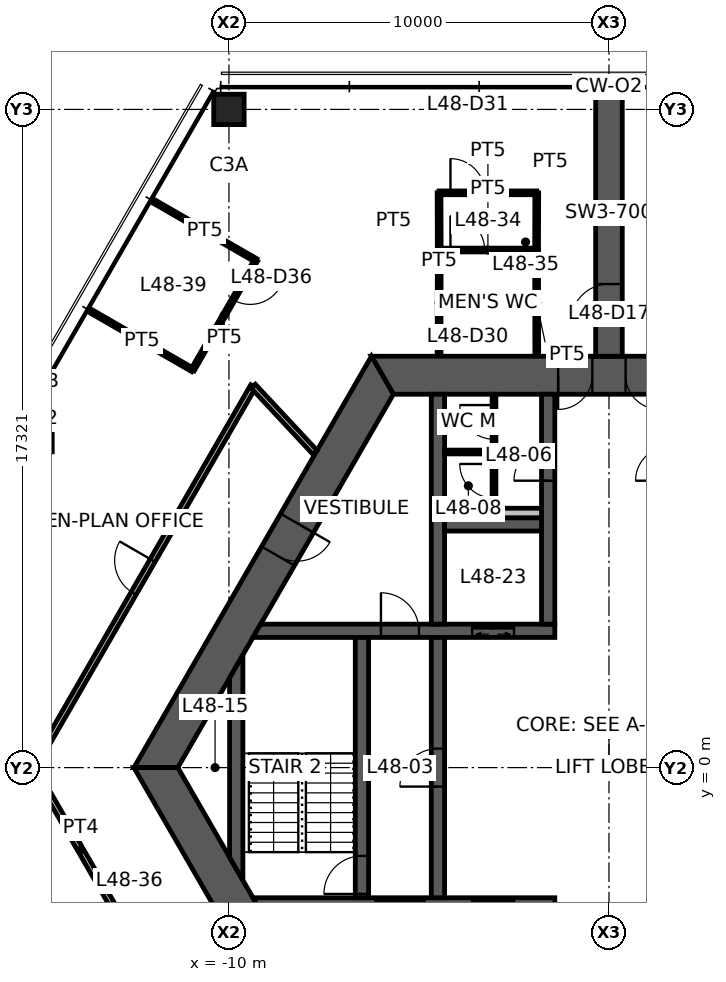
"""IFC4 building model, lengths in metres.
Left out: names, types, materials, properties, quantities, classifications, styles, units other than length and angle.
Written with IfcOpenShell. Run it as: python <this file> out.ifc"""

import sys

from ifc_helpers import new_model, si_unit, direction, frame, frame_2d, origin, origin_2d, place, context, subcontext, project, spatial, polyline, rectangle, hollow_rectangle, outline, extrude, element, fill, save


model = new_model("IFC4")
c1 = context("Model", 3, precision=1e-05, world=origin(), true_north=direction((0.0, 1.0)))
c2 = subcontext(c1, "Body", "Model", "MODEL_VIEW")
j1 = project(units=[si_unit("LENGTHUNIT", "METRE"), si_unit("PLANEANGLEUNIT", "RADIAN")], contexts=[c1])
p1 = place(None, origin())
s1 = spatial("IfcSite", under=j1, at=p1, CompositionType="ELEMENT")
p2 = place(p1, origin())
s2 = spatial("IfcBuilding", under=s1, at=p2, CompositionType="ELEMENT")
p3 = place(p2, frame((0.0, 0.0, 191.6)))
s3 = spatial("IfcBuildingStorey", under=s2, at=p3, CompositionType="ELEMENT", Elevation=191.6)
p4 = place(p3, frame((-10.0, 17.321, 0.0), z_axis=(0.0, 0.0, 1.0), x_axis=(1.0, 0.0, 0.0)))
e1 = element("IfcColumn", 1, at=p4, inside=s3, PredefinedType="COLUMN", context=c2, shape_type="SweptSolid", body=[
    extrude(hollow_rectangle(XDim=0.8, YDim=0.8, WallThickness=0.045, at=origin_2d()), origin(), (0.0, 0.0, 1.0), 3.9),
])
p5 = place(p3, frame((5.961, 10.325, 0.0), z_axis=(0.0, 0.0, 1.0), x_axis=(-1.0, 0.0, 0.0)))
e2 = element("IfcWall", 2, at=p5, inside=s3, PredefinedType="SHEAR", context=c2, shape_type="SweptSolid", body=[
    extrude(outline(polyline([(-0.289, -0.5), (4.624, -0.5), (5.523, -0.5), (6.399, -0.5), (7.299, -0.5), (12.211, -0.5), (11.634, 0.5), (7.299, 0.5), (6.399, 0.5), (5.523, 0.5), (4.624, 0.5), (0.289, 0.5), (-0.289, -0.5)])), origin(), (0.0, 0.0, 1.0), 3.9),
])
p6 = place(p5, frame((6.399, 0.0, 0.0)))
e3 = element("IfcOpeningElement", 3, at=p6, cuts=e2, PredefinedType="OPENING", context=c2, shape_type="SweptSolid", body=[
    extrude(rectangle(XDim=0.9, YDim=2.1, at=frame_2d((0.45, 1.05))), frame((0.0, 0.51, 0.0), z_axis=(0.0, -1.0, 0.0), x_axis=(1.0, 0.0, 0.0)), (0.0, 0.0, 1.0), 1.02),
])
p7 = place(p5, frame((4.624, 0.0, 0.0)))
e4 = element("IfcOpeningElement", 4, at=p7, cuts=e2, PredefinedType="OPENING", context=c2, shape_type="SweptSolid", body=[
    extrude(rectangle(XDim=0.9, YDim=2.1, at=frame_2d((0.45, 1.05))), frame((0.0, 0.51, 0.0), z_axis=(0.0, -1.0, 0.0), x_axis=(1.0, 0.0, 0.0)), (0.0, 0.0, 1.0), 1.02),
])
p8 = place(p3, frame((-5.961, 10.325, 0.0), z_axis=(0.0, 0.0, 1.0), x_axis=(-0.500004296715, -0.866022923061, 0.0)))
e5 = element("IfcWall", 5, at=p8, inside=s3, PredefinedType="SHEAR", context=c2, shape_type="SweptSolid", body=[
    extrude(outline(polyline([(-0.289, -0.5), (4.494, -0.5), (5.494, -0.5), (12.211, -0.5), (11.634, 0.5), (5.494, 0.5), (4.494, 0.5), (0.289, 0.5), (-0.289, -0.5)])), origin(), (0.0, 0.0, 1.0), 3.9),
])
p9 = place(p8, frame((4.494, 0.0, 0.0)))
e6 = element("IfcOpeningElement", 6, at=p9, cuts=e5, PredefinedType="OPENING", context=c2, shape_type="SweptSolid", body=[
    extrude(rectangle(XDim=1.0, YDim=2.1, at=frame_2d((0.5, 1.05))), frame((0.0, 0.51, 0.0), z_axis=(0.0, -1.0, 0.0), x_axis=(1.0, 0.0, 0.0)), (0.0, 0.0, 1.0), 1.02),
])
p10 = place(p3, frame((-11.922, 0.0, 0.0), z_axis=(0.0, 0.0, 1.0), x_axis=(0.500004296715, -0.866022923061, 0.0)))
e7 = element("IfcWall", 7, at=p10, inside=s3, PredefinedType="SHEAR", context=c2, shape_type="SweptSolid", body=[
    extrude(outline(polyline([(-0.289, -0.5), (6.331, -0.5), (7.131, -0.5), (12.211, -0.5), (11.634, 0.5), (7.131, 0.5), (6.331, 0.5), (0.289, 0.5), (-0.289, -0.5)])), origin(), (0.0, 0.0, 1.0), 3.9),
])
p11 = place(p10, frame((6.331, 0.0, 0.0)))
e8 = element("IfcOpeningElement", 8, at=p11, cuts=e7, PredefinedType="OPENING", context=c2, shape_type="SweptSolid", body=[
    extrude(rectangle(XDim=0.8, YDim=2.1, at=frame_2d((0.4, 1.05))), frame((0.0, 0.51, 0.0), z_axis=(0.0, -1.0, 0.0), x_axis=(1.0, 0.0, 0.0)), (0.0, 0.0, 1.0), 1.02),
])
p12 = place(p3, frame((0.0, 10.825, 0.0), z_axis=(0.0, 0.0, 1.0), x_axis=(0.0, 1.0, 0.0)))
e9 = element("IfcWall", 9, at=p12, inside=s3, PredefinedType="SHEAR", context=c2, shape_type="SweptSolid", body=[
    extrude(rectangle(XDim=6.946, YDim=0.7, at=frame_2d((3.473, 0.0))), origin(), (0.0, 0.0, 1.0), 3.9),
])
p13 = place(p12, frame((0.9, 0.0, 0.0)))
e10 = element("IfcOpeningElement", 10, at=p13, cuts=e9, PredefinedType="OPENING", context=c2, shape_type="SweptSolid", body=[
    extrude(rectangle(XDim=1.0, YDim=2.1, at=frame_2d((0.5, 1.05))), frame((0.0, 0.36, 0.0), z_axis=(0.0, -1.0, 0.0), x_axis=(1.0, 0.0, 0.0)), (0.0, 0.0, 1.0), 0.72),
])
p14 = place(p3, frame((-9.266, 3.6, 0.0), z_axis=(0.0, 0.0, 1.0), x_axis=(1.0, 0.0, 0.0)))
e11 = element("IfcWall", 11, at=p14, inside=s3, PredefinedType="SHEAR", context=c2, shape_type="SweptSolid", body=[
    extrude(outline(polyline([(-0.101, -0.175), (3.266, -0.175), (4.266, -0.175), (5.667, -0.175), (6.767, -0.175), (7.841, -0.175), (7.841, 0.175), (6.767, 0.175), (5.667, 0.175), (4.266, 0.175), (3.266, 0.175), (0.101, 0.175), (-0.101, -0.175)])), origin(), (0.0, 0.0, 1.0), 3.9),
])
p15 = place(p14, frame((3.266, 0.0, 0.0)))
e12 = element("IfcOpeningElement", 12, at=p15, cuts=e11, PredefinedType="OPENING", context=c2, shape_type="SweptSolid", body=[
    extrude(rectangle(XDim=1.0, YDim=2.1, at=frame_2d((0.5, 1.05))), frame((0.0, 0.185, 0.0), z_axis=(0.0, -1.0, 0.0), x_axis=(1.0, 0.0, 0.0)), (0.0, 0.0, 1.0), 0.37),
])
p16 = place(p14, frame((5.667, 0.0, 0.0)))
e13 = element("IfcOpeningElement", 13, at=p16, cuts=e11, PredefinedType="OPENING", context=c2, shape_type="SweptSolid", body=[
    extrude(rectangle(XDim=1.1, YDim=2.1, at=frame_2d((0.55, 1.05))), frame((0.0, 0.185, 0.0), z_axis=(0.0, -1.0, 0.0), x_axis=(1.0, 0.0, 0.0)), (0.0, 0.0, 1.0), 0.37),
])
p17 = place(p3, frame((-9.266, -3.6, 0.0), z_axis=(0.0, 0.0, 1.0), x_axis=(1.0, 0.0, 0.0)))
e14 = element("IfcWall", 14, at=p17, inside=s3, PredefinedType="SHEAR", context=c2, shape_type="SweptSolid", body=[
    extrude(outline(polyline([(0.101, -0.175), (3.116, -0.175), (4.417, -0.175), (5.667, -0.175), (6.767, -0.175), (7.841, -0.175), (7.841, 0.175), (6.767, 0.175), (5.667, 0.175), (4.417, 0.175), (3.116, 0.175), (-0.101, 0.175), (0.101, -0.175)])), origin(), (0.0, 0.0, 1.0), 3.9),
])
p18 = place(p17, frame((5.667, 0.0, 0.0)))
e15 = element("IfcOpeningElement", 15, at=p18, cuts=e14, PredefinedType="OPENING", context=c2, shape_type="SweptSolid", body=[
    extrude(rectangle(XDim=1.1, YDim=2.1, at=frame_2d((0.55, 1.05))), frame((0.0, 0.185, 0.0), z_axis=(0.0, -1.0, 0.0), x_axis=(1.0, 0.0, 0.0)), (0.0, 0.0, 1.0), 0.37),
])
p19 = place(p17, frame((3.116, 0.0, 0.0)))
e16 = element("IfcOpeningElement", 16, at=p19, cuts=e14, PredefinedType="OPENING", context=c2, shape_type="SweptSolid", body=[
    extrude(rectangle(XDim=1.3, YDim=2.1, at=frame_2d((0.65, 1.05))), frame((0.0, 0.185, 0.0), z_axis=(0.0, -1.0, 0.0), x_axis=(1.0, 0.0, 0.0)), (0.0, 0.0, 1.0), 0.37),
])
p20 = place(p3, frame((-1.6, 3.775, 0.0), z_axis=(0.0, 0.0, 1.0), x_axis=(0.0, 1.0, 0.0)))
e17 = element("IfcWall", 17, at=p20, inside=s3, PredefinedType="SHEAR", context=c2, shape_type="SweptSolid", body=[
    extrude(rectangle(XDim=6.05, YDim=0.35, at=frame_2d((3.025, 0.0))), origin(), (0.0, 0.0, 1.0), 3.9),
])
p21 = place(p20, frame((3.775, 0.0, 0.0)))
e18 = element("IfcOpeningElement", 18, at=p21, cuts=e17, PredefinedType="OPENING", context=c2, shape_type="SweptSolid", body=[
    extrude(rectangle(XDim=0.9, YDim=2.1, at=frame_2d((0.45, 1.05))), frame((0.0, 0.185, 0.0), z_axis=(0.0, -1.0, 0.0), x_axis=(1.0, 0.0, 0.0)), (0.0, 0.0, 1.0), 0.37),
])
p22 = place(p3, frame((-4.5, -3.425, 0.0), z_axis=(0.0, 0.0, 1.0), x_axis=(0.0, 1.0, 0.0)))
e19 = element("IfcWall", 19, at=p22, inside=s3, PredefinedType="SHEAR", context=c2, shape_type="SweptSolid", body=[
    extrude(rectangle(XDim=6.85, YDim=0.35, at=frame_2d((3.425, 0.0))), origin(), (0.0, 0.0, 1.0), 3.9),
])
p23 = place(p22, frame((2.925, 0.0, 0.0)))
e20 = element("IfcOpeningElement", 20, at=p23, cuts=e19, PredefinedType="OPENING", context=c2, shape_type="SweptSolid", body=[
    extrude(rectangle(XDim=1.0, YDim=2.1, at=frame_2d((0.5, 1.05))), frame((0.0, 0.185, 0.0), z_axis=(0.0, -1.0, 0.0), x_axis=(1.0, 0.0, 0.0)), (0.0, 0.0, 1.0), 0.37),
])
p24 = place(p3, frame((-6.5, -3.425, 0.0), z_axis=(0.0, 0.0, 1.0), x_axis=(0.0, 1.0, 0.0)))
e21 = element("IfcWall", 21, at=p24, inside=s3, PredefinedType="SHEAR", context=c2, shape_type="SweptSolid", body=[
    extrude(rectangle(XDim=6.85, YDim=0.35, at=frame_2d((3.425, 0.0))), origin(), (0.0, 0.0, 1.0), 3.9),
])
p25 = place(p24, frame((0.1, 0.0, 0.0)))
e22 = element("IfcOpeningElement", 22, at=p25, cuts=e21, PredefinedType="OPENING", context=c2, shape_type="SweptSolid", body=[
    extrude(rectangle(XDim=1.0, YDim=2.1, at=frame_2d((0.5, 1.05))), frame((0.0, 0.185, 0.0), z_axis=(0.0, -1.0, 0.0), x_axis=(1.0, 0.0, 0.0)), (0.0, 0.0, 1.0), 0.37),
])
p26 = place(p3, frame((-4.5, 3.775, 0.0), z_axis=(0.0, 0.0, 1.0), x_axis=(0.0, 1.0, 0.0)))
e23 = element("IfcWall", 23, at=p26, inside=s3, PredefinedType="SHEAR", context=c2, shape_type="SweptSolid", body=[
    extrude(rectangle(XDim=6.05, YDim=0.35, at=frame_2d((3.025, 0.0))), origin(), (0.0, 0.0, 1.0), 3.9),
])
p27 = place(p3, frame((-4.325, 6.4, 0.0), z_axis=(0.0, 0.0, 1.0), x_axis=(1.0, 0.0, 0.0)))
e24 = element("IfcWall", 24, at=p27, inside=s3, PredefinedType="SHEAR", context=c2, shape_type="SweptSolid", body=[
    extrude(rectangle(XDim=2.55, YDim=0.35, at=frame_2d((1.275, 0.0))), origin(), (0.0, 0.0, 1.0), 3.9),
])
p28 = place(p3, frame((-9.808, -2.662, 0.0), z_axis=(0.0, 0.0, 1.0), x_axis=(0.0, 1.0, 0.0)))
e25 = element("IfcWall", 25, at=p28, inside=s3, PredefinedType="SHEAR", context=c2, shape_type="SweptSolid", body=[
    extrude(outline(polyline([(-0.303, -0.175), (5.628, -0.175), (5.021, 0.175), (0.303, 0.175), (-0.303, -0.175)])), origin(), (0.0, 0.0, 1.0), 3.9),
])
p29 = place(p3, frame((-4.325, 6.7, 0.0), z_axis=(0.0, 0.0, 1.0), x_axis=(1.0, 0.0, 0.0)))
e26 = element("IfcWall", 26, at=p29, inside=s3, PredefinedType="PLUMBINGWALL", context=c2, shape_type="SweptSolid", body=[
    extrude(rectangle(XDim=2.55, YDim=0.25, at=frame_2d((1.275, 0.0))), origin(), (0.0, 0.0, 1.0), 3.9),
])
p30 = place(p3, frame((-3.025, 6.575, 0.0), z_axis=(0.0, 0.0, 1.0), x_axis=(0.0, 1.0, 0.0)))
e27 = element("IfcWall", 27, at=p30, inside=s3, PredefinedType="PARTITIONING", context=c2, shape_type="SweptSolid", body=[
    extrude(rectangle(XDim=3.25, YDim=0.1, at=frame_2d((1.625, 0.0))), origin(), (0.0, 0.0, 1.0), 2.95),
])
p31 = place(p30, frame((2.065, 0.0, 0.0)))
e28 = element("IfcOpeningElement", 28, at=p31, cuts=e27, PredefinedType="OPENING", context=c2, shape_type="SweptSolid", body=[
    extrude(rectangle(XDim=0.9, YDim=2.1, at=frame_2d((0.45, 1.05))), frame((0.0, 0.06, 0.0), z_axis=(0.0, -1.0, 0.0), x_axis=(1.0, 0.0, 0.0)), (0.0, 0.0, 1.0), 0.12),
])
p32 = place(p30, frame((0.515, 0.0, 0.0)))
e29 = element("IfcOpeningElement", 29, at=p32, cuts=e27, PredefinedType="OPENING", context=c2, shape_type="SweptSolid", body=[
    extrude(rectangle(XDim=0.9, YDim=2.1, at=frame_2d((0.45, 1.05))), frame((0.0, 0.06, 0.0), z_axis=(0.0, -1.0, 0.0), x_axis=(1.0, 0.0, 0.0)), (0.0, 0.0, 1.0), 0.12),
])
p33 = place(p3, frame((-3.075, 8.305, 0.0), z_axis=(0.0, 0.0, 1.0), x_axis=(-1.0, 0.0, 0.0)))
e30 = element("IfcWall", 30, at=p33, inside=s3, PredefinedType="PARTITIONING", context=c2, shape_type="SweptSolid", body=[
    extrude(rectangle(XDim=1.25, YDim=0.1, at=frame_2d((0.625, 0.0))), origin(), (0.0, 0.0, 1.0), 2.95),
])
p34 = place(p3, frame((-4.471, 13.62, 0.0), z_axis=(0.0, 0.0, 1.0), x_axis=(1.0, 0.0, 0.0)))
e31 = element("IfcWall", 31, at=p34, inside=s3, PredefinedType="PARTITIONING", context=c2, shape_type="SweptSolid", body=[
    extrude(rectangle(XDim=2.571, YDim=0.1, at=frame_2d((1.286, 0.0))), origin(), (0.0, 0.0, 1.0), 2.95),
])
p35 = place(p34, frame((0.3, 0.0, 0.0)))
e32 = element("IfcOpeningElement", 32, at=p35, cuts=e31, PredefinedType="OPENING", context=c2, shape_type="SweptSolid", body=[
    extrude(rectangle(XDim=0.9, YDim=2.1, at=frame_2d((0.45, 1.05))), frame((0.0, 0.06, 0.0), z_axis=(0.0, -1.0, 0.0), x_axis=(1.0, 0.0, 0.0)), (0.0, 0.0, 1.0), 0.12),
])
for number, where, z_axis, x_axis in (
    (33, (-4.471, 10.845, 0.0), (0.0, 0.0, 1.0), (0.002, 1.0, 0.0)),
    (34, (-1.905, 13.625, 0.0), (0.0, 0.0, 1.0), (0.002, -1.0, 0.0)),
):
    element("IfcWall", number, at=place(p3, frame(where, z_axis=z_axis, x_axis=x_axis)), inside=s3, PredefinedType="PARTITIONING", context=c2, shape_type="SweptSolid", body=[
        extrude(rectangle(XDim=2.78, YDim=0.1, at=frame_2d((1.39, 0.0))), origin(), (0.0, 0.0, 1.0), 2.95),
    ])
p36 = place(p3, frame((-4.471, 15.125, 0.0), z_axis=(0.0, 0.0, 1.0), x_axis=(1.0, 0.0, 0.0)))
e35 = element("IfcWall", 35, at=p36, inside=s3, PredefinedType="PARTITIONING", context=c2, shape_type="SweptSolid", body=[
    extrude(rectangle(XDim=2.571, YDim=0.1, at=frame_2d((1.286, 0.0))), origin(), (0.0, 0.0, 1.0), 2.95),
])
p37 = place(p36, frame((0.3, 0.0, 0.0)))
e36 = element("IfcOpeningElement", 36, at=p37, cuts=e35, PredefinedType="OPENING", context=c2, shape_type="SweptSolid", body=[
    extrude(rectangle(XDim=0.9, YDim=2.1, at=frame_2d((0.45, 1.05))), frame((0.0, 0.06, 0.0), z_axis=(0.0, -1.0, 0.0), x_axis=(1.0, 0.0, 0.0)), (0.0, 0.0, 1.0), 0.12),
])
for number, where, z_axis, x_axis in (
    (37, (-4.466, 13.625, 0.0), (0.0, 0.0, 1.0), (-0.003, 1.0, 0.0)),
    (38, (-1.9, 15.125, 0.0), (0.0, 0.0, 1.0), (-0.003, -1.0, 0.0)),
):
    element("IfcWall", number, at=place(p3, frame(where, z_axis=z_axis, x_axis=x_axis)), inside=s3, PredefinedType="PARTITIONING", context=c2, shape_type="SweptSolid", body=[
        extrude(rectangle(XDim=1.5, YDim=0.1, at=frame_2d((0.75, 0.0))), origin(), (0.0, 0.0, 1.0), 2.95),
    ])
p38 = place(p3, frame((-15.156, 0.0, 0.0), z_axis=(0.0, 0.0, 1.0), x_axis=(0.500012970505, 0.86601791513, 0.0)))
e39 = element("IfcWall", 39, at=p38, inside=s3, PredefinedType="PARTITIONING", context=c2, shape_type="SweptSolid", body=[
    extrude(rectangle(XDim=11.591, YDim=0.15, at=frame_2d((5.795, 0.0))), origin(), (0.0, 0.0, 1.0), 2.95),
])
p39 = place(p38, frame((5.295, 0.0, 0.0)))
e40 = element("IfcOpeningElement", 40, at=p39, cuts=e39, PredefinedType="OPENING", context=c2, shape_type="SweptSolid", body=[
    extrude(rectangle(XDim=1.0, YDim=2.1, at=frame_2d((0.5, 1.05))), frame((0.0, 0.085, 0.0), z_axis=(0.0, -1.0, 0.0), x_axis=(1.0, 0.0, 0.0)), (0.0, 0.0, 1.0), 0.17),
])
p40 = place(p3, frame((-12.642, -4.354, 0.0), z_axis=(0.0, 0.0, 1.0), x_axis=(-0.500019495363, 0.866014147839, 0.0)))
e41 = element("IfcWall", 41, at=p40, inside=s3, PredefinedType="PARTITIONING", context=c2, shape_type="SweptSolid", body=[
    extrude(rectangle(XDim=5.028, YDim=0.15, at=frame_2d((2.514, 0.0))), origin(), (0.0, 0.0, 1.0), 2.95),
])
p41 = place(p3, frame((-9.36, 10.038, 0.0), z_axis=(0.0, 0.0, 1.0), x_axis=(0.681997114248, -0.731354863358, 0.0)))
e42 = element("IfcWall", 42, at=p41, inside=s3, PredefinedType="PARTITIONING", context=c2, shape_type="SweptSolid", body=[
    extrude(outline(polyline([(0.0, -0.075), (2.384, -0.075), (2.384, 0.0), (2.382, 0.075), (0.0, 0.075), (0.0, -0.075)])), origin(), (0.0, 0.0, 1.0), 2.95),
])
p42 = place(p3, frame((-11.98, 14.902, 0.0), z_axis=(0.0, 0.0, 1.0), x_axis=(0.866042875753, -0.499969736442, 0.0)))
e43 = element("IfcWall", 43, at=p42, inside=s3, PredefinedType="PARTITIONING", context=c2, shape_type="SweptSolid", body=[
    extrude(rectangle(XDim=3.105, YDim=0.1, at=frame_2d((1.553, 0.0))), origin(), (0.0, 0.0, 1.0), 2.95),
])
p43 = place(p3, frame((-10.956, 10.465, 0.0), z_axis=(0.0, 0.0, 1.0), x_axis=(-0.866044340336, 0.499967199496, 0.0)))
e44 = element("IfcWall", 44, at=p43, inside=s3, PredefinedType="PARTITIONING", context=c2, shape_type="SweptSolid", body=[
    extrude(rectangle(XDim=3.08, YDim=0.1, at=frame_2d((1.54, 0.0))), origin(), (0.0, 0.0, 1.0), 2.95),
])
p44 = place(p3, frame((-9.291, 13.349, 0.0), z_axis=(0.0, 0.0, 1.0), x_axis=(-0.500033344505, -0.86600615147, 0.0)))
e45 = element("IfcWall", 45, at=p44, inside=s3, PredefinedType="PARTITIONING", context=c2, shape_type="SweptSolid", body=[
    extrude(rectangle(XDim=3.331, YDim=0.1, at=frame_2d((1.666, 0.0))), origin(), (0.0, 0.0, 1.0), 2.95),
])
p45 = place(p44, frame((0.3, 0.0, 0.0)))
e46 = element("IfcOpeningElement", 46, at=p45, cuts=e45, PredefinedType="OPENING", context=c2, shape_type="SweptSolid", body=[
    extrude(rectangle(XDim=0.9, YDim=2.1, at=frame_2d((0.45, 1.05))), frame((0.0, 0.06, 0.0), z_axis=(0.0, -1.0, 0.0), x_axis=(1.0, 0.0, 0.0)), (0.0, 0.0, 1.0), 0.12),
])
p46 = place(p3, frame((0.0, 17.771, 0.0), z_axis=(0.0, 0.0, 1.0), x_axis=(0.0, 1.0, 0.0)))
e47 = element("IfcWall", 47, at=p46, inside=s3, PredefinedType="PARTITIONING", context=c2, shape_type="SweptSolid", body=[
    extrude(rectangle(XDim=0.08, YDim=0.175, at=frame_2d((0.04, 0.0))), origin(), (0.0, 0.0, 1.0), 3.9),
])
p47 = place(p6, origin())
e48 = element("IfcDoor", 48, at=p47, inside=s3, OperationType="SINGLE_SWING_RIGHT", PredefinedType="DOOR", context=c2, shape_type="SweptSolid", body=[
    extrude(rectangle(XDim=0.9, YDim=2.1, at=frame_2d((0.45, 1.05))), frame((0.0, 0.025, 0.0), z_axis=(0.0, -1.0, 0.0), x_axis=(1.0, 0.0, 0.0)), (0.0, 0.0, 1.0), 0.05),
])
fill(e3, e48)
p48 = place(p7, origin())
e49 = element("IfcDoor", 49, at=p48, inside=s3, OperationType="SINGLE_SWING_LEFT", PredefinedType="DOOR", context=c2, shape_type="SweptSolid", body=[
    extrude(rectangle(XDim=0.9, YDim=2.1, at=frame_2d((0.45, 1.05))), frame((0.0, 0.025, 0.0), z_axis=(0.0, -1.0, 0.0), x_axis=(1.0, 0.0, 0.0)), (0.0, 0.0, 1.0), 0.05),
])
fill(e4, e49)
p49 = place(p9, origin())
e50 = element("IfcDoor", 50, at=p49, inside=s3, OperationType="SINGLE_SWING_LEFT", PredefinedType="DOOR", context=c2, shape_type="SweptSolid", body=[
    extrude(rectangle(XDim=1.0, YDim=2.1, at=frame_2d((0.5, 1.05))), frame((0.0, 0.025, 0.0), z_axis=(0.0, -1.0, 0.0), x_axis=(1.0, 0.0, 0.0)), (0.0, 0.0, 1.0), 0.05),
])
fill(e6, e50)
p50 = place(p23, origin())
e51 = element("IfcDoor", 51, at=p50, inside=s3, OperationType="SINGLE_SWING_LEFT", PredefinedType="DOOR", context=c2, shape_type="SweptSolid", body=[
    extrude(rectangle(XDim=1.0, YDim=2.1, at=frame_2d((0.5, 1.05))), frame((0.0, 0.025, 0.0), z_axis=(0.0, -1.0, 0.0), x_axis=(1.0, 0.0, 0.0)), (0.0, 0.0, 1.0), 0.05),
])
fill(e20, e51)
p51 = place(p25, origin())
e52 = element("IfcDoor", 52, at=p51, inside=s3, OperationType="SINGLE_SWING_LEFT", PredefinedType="DOOR", context=c2, shape_type="SweptSolid", body=[
    extrude(rectangle(XDim=1.0, YDim=2.1, at=frame_2d((0.5, 1.05))), frame((0.0, 0.025, 0.0), z_axis=(0.0, -1.0, 0.0), x_axis=(1.0, 0.0, 0.0)), (0.0, 0.0, 1.0), 0.05),
])
fill(e22, e52)
p52 = place(p15, origin())
e53 = element("IfcDoor", 53, at=p52, inside=s3, OperationType="SINGLE_SWING_LEFT", PredefinedType="DOOR", context=c2, shape_type="SweptSolid", body=[
    extrude(rectangle(XDim=1.0, YDim=2.1, at=frame_2d((0.5, 1.05))), frame((0.0, 0.025, 0.0), z_axis=(0.0, -1.0, 0.0), x_axis=(1.0, 0.0, 0.0)), (0.0, 0.0, 1.0), 0.05),
])
fill(e12, e53)
p53 = place(p21, origin())
e54 = element("IfcDoor", 54, at=p53, inside=s3, OperationType="SINGLE_SWING_LEFT", PredefinedType="DOOR", context=c2, shape_type="SweptSolid", body=[
    extrude(rectangle(XDim=0.9, YDim=2.1, at=frame_2d((0.45, 1.05))), frame((0.0, 0.025, 0.0), z_axis=(0.0, -1.0, 0.0), x_axis=(1.0, 0.0, 0.0)), (0.0, 0.0, 1.0), 0.05),
])
fill(e18, e54)
p54 = place(p13, origin())
e55 = element("IfcDoor", 55, at=p54, inside=s3, OperationType="SINGLE_SWING_LEFT", PredefinedType="DOOR", context=c2, shape_type="SweptSolid", body=[
    extrude(rectangle(XDim=1.0, YDim=2.1, at=frame_2d((0.5, 1.05))), frame((0.0, 0.025, 0.0), z_axis=(0.0, -1.0, 0.0), x_axis=(1.0, 0.0, 0.0)), (0.0, 0.0, 1.0), 0.05),
])
fill(e10, e55)
p55 = place(p31, origin())
e56 = element("IfcDoor", 56, at=p55, inside=s3, OperationType="SINGLE_SWING_RIGHT", PredefinedType="DOOR", context=c2, shape_type="SweptSolid", body=[
    extrude(rectangle(XDim=0.9, YDim=2.1, at=frame_2d((0.45, 1.05))), frame((0.0, 0.025, 0.0), z_axis=(0.0, -1.0, 0.0), x_axis=(1.0, 0.0, 0.0)), (0.0, 0.0, 1.0), 0.05),
])
fill(e28, e56)
p56 = place(p32, origin())
e57 = element("IfcDoor", 57, at=p56, inside=s3, OperationType="SINGLE_SWING_RIGHT", PredefinedType="DOOR", context=c2, shape_type="SweptSolid", body=[
    extrude(rectangle(XDim=0.9, YDim=2.1, at=frame_2d((0.45, 1.05))), frame((0.0, 0.025, 0.0), z_axis=(0.0, -1.0, 0.0), x_axis=(1.0, 0.0, 0.0)), (0.0, 0.0, 1.0), 0.05),
])
fill(e29, e57)
p57 = place(p35, origin())
e58 = element("IfcDoor", 58, at=p57, inside=s3, OperationType="SINGLE_SWING_LEFT", PredefinedType="DOOR", context=c2, shape_type="SweptSolid", body=[
    extrude(rectangle(XDim=0.9, YDim=2.1, at=frame_2d((0.45, 1.05))), frame((0.0, 0.025, 0.0), z_axis=(0.0, -1.0, 0.0), x_axis=(1.0, 0.0, 0.0)), (0.0, 0.0, 1.0), 0.05),
])
fill(e32, e58)
p58 = place(p37, origin())
e59 = element("IfcDoor", 59, at=p58, inside=s3, OperationType="SINGLE_SWING_LEFT", PredefinedType="DOOR", context=c2, shape_type="SweptSolid", body=[
    extrude(rectangle(XDim=0.9, YDim=2.1, at=frame_2d((0.45, 1.05))), frame((0.0, 0.025, 0.0), z_axis=(0.0, -1.0, 0.0), x_axis=(1.0, 0.0, 0.0)), (0.0, 0.0, 1.0), 0.05),
])
fill(e36, e59)
p59 = place(p39, origin())
e60 = element("IfcDoor", 60, at=p59, inside=s3, OperationType="SINGLE_SWING_RIGHT", PredefinedType="DOOR", context=c2, shape_type="SweptSolid", body=[
    extrude(rectangle(XDim=1.0, YDim=2.1, at=frame_2d((0.5, 1.05))), frame((0.0, 0.025, 0.0), z_axis=(0.0, -1.0, 0.0), x_axis=(1.0, 0.0, 0.0)), (0.0, 0.0, 1.0), 0.05),
])
fill(e40, e60)
p60 = place(p45, origin())
e61 = element("IfcDoor", 61, at=p60, inside=s3, OperationType="SINGLE_SWING_LEFT", PredefinedType="DOOR", context=c2, shape_type="SweptSolid", body=[
    extrude(rectangle(XDim=0.9, YDim=2.1, at=frame_2d((0.45, 1.05))), frame((0.0, 0.025, 0.0), z_axis=(0.0, -1.0, 0.0), x_axis=(1.0, 0.0, 0.0)), (0.0, 0.0, 1.0), 0.05),
])
fill(e46, e61)
p61 = place(p16, origin())
e62 = element("IfcDoor", 62, at=p61, inside=s3, OperationType="DOUBLE_DOOR_SLIDING", PredefinedType="DOOR", context=c2, shape_type="SweptSolid", body=[
    extrude(rectangle(XDim=1.1, YDim=2.1, at=frame_2d((0.55, 1.05))), frame((0.0, 0.025, 0.0), z_axis=(0.0, -1.0, 0.0), x_axis=(1.0, 0.0, 0.0)), (0.0, 0.0, 1.0), 0.05),
])
fill(e13, e62)
save(model, sys.argv[1])
